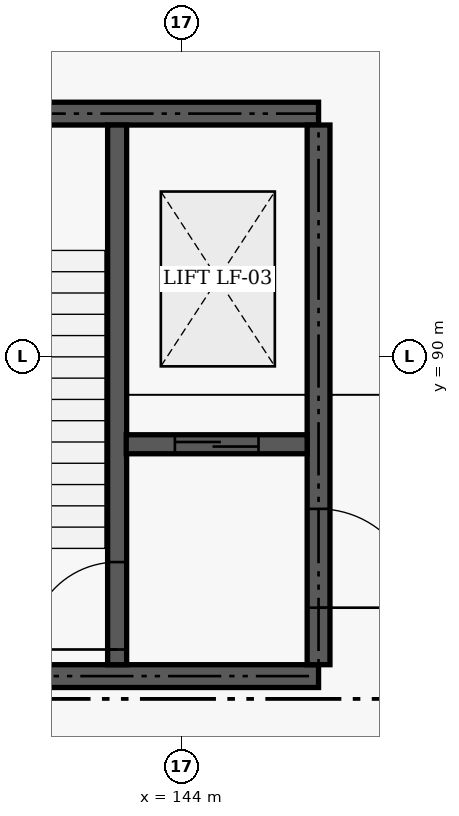
"""IFC4 building model, lengths in metres.
Left out: names, types, materials, properties, quantities, classifications, styles, units other than length and angle.
Written with IfcOpenShell. Run it as: python <this file> out.ifc"""

import sys

from ifc_helpers import new_model, si_unit, direction, frame, frame_2d, origin, place, context, subcontext, project, spatial, rectangle, extrude, element, fill, save


model = new_model("IFC4")
c1 = context("Model", 3, precision=1e-05, world=origin(), true_north=direction((0.0, 1.0)))
c2 = subcontext(c1, "Body", "Model", "MODEL_VIEW")
j1 = project(units=[si_unit("LENGTHUNIT", "METRE"), si_unit("PLANEANGLEUNIT", "RADIAN")], contexts=[c1])
p1 = place(None, origin())
s1 = spatial("IfcSite", under=j1, at=p1, CompositionType="ELEMENT")
p2 = place(p1, origin())
s2 = spatial("IfcBuilding", under=s1, at=p2, CompositionType="ELEMENT")
p3 = place(p2, origin())
s3 = spatial("IfcBuildingStorey", under=s2, at=p3, CompositionType="ELEMENT", Elevation=0.0)
p4 = place(p3, frame((139.2, 85.8, 0.0), z_axis=(0.0, 0.0, 1.0), x_axis=(1.0, 0.0, 0.0)))
e1 = element("IfcWall", 1, at=p4, inside=s3, PredefinedType="SHEAR", context=c2, shape_type="SweptSolid", body=[
    extrude(rectangle(XDim=6.6, YDim=0.3, at=frame_2d((3.3, 0.0))), origin(), (0.0, 0.0, 1.0), 5.4),
])
p5 = place(p4, frame((1.0, 0.0, 0.0)))
e2 = element("IfcOpeningElement", 2, at=p5, cuts=e1, PredefinedType="OPENING", context=c2, shape_type="SweptSolid", body=[
    extrude(rectangle(XDim=1.8, YDim=2.15, at=frame_2d((0.9, 1.075))), frame((0.0, 0.16, 0.0), z_axis=(0.0, -1.0, 0.0), x_axis=(1.0, 0.0, 0.0)), (0.0, 0.0, 1.0), 0.32),
])
p6 = place(p3, frame((139.2, 93.2, 0.0), z_axis=(0.0, 0.0, 1.0), x_axis=(1.0, 0.0, 0.0)))
e3 = element("IfcWall", 3, at=p6, inside=s3, PredefinedType="SHEAR", context=c2, shape_type="SweptSolid", body=[
    extrude(rectangle(XDim=6.6, YDim=0.3, at=frame_2d((3.3, 0.0))), origin(), (0.0, 0.0, 1.0), 5.4),
])
p7 = place(p3, frame((145.8, 85.95, 0.0), z_axis=(0.0, 0.0, 1.0), x_axis=(0.0, 1.0, 0.0)))
e4 = element("IfcWall", 4, at=p7, inside=s3, PredefinedType="SHEAR", context=c2, shape_type="SweptSolid", body=[
    extrude(rectangle(XDim=7.1, YDim=0.3, at=frame_2d((3.55, 0.0))), origin(), (0.0, 0.0, 1.0), 5.4),
])
p8 = place(p7, frame((0.75, 0.0, 0.0)))
e5 = element("IfcOpeningElement", 5, at=p8, cuts=e4, PredefinedType="OPENING", context=c2, shape_type="SweptSolid", body=[
    extrude(rectangle(XDim=1.3, YDim=2.15, at=frame_2d((0.65, 1.075))), frame((0.0, 0.16, 0.0), z_axis=(0.0, -1.0, 0.0), x_axis=(1.0, 0.0, 0.0)), (0.0, 0.0, 1.0), 0.32),
])
p9 = place(p3, frame((143.15, 85.95, 0.0), z_axis=(0.0, 0.0, 1.0), x_axis=(0.0, 1.0, 0.0)))
e6 = element("IfcWall", 6, at=p9, inside=s3, PredefinedType="SHEAR", context=c2, shape_type="SweptSolid", body=[
    extrude(rectangle(XDim=7.1, YDim=0.25, at=frame_2d((3.55, 0.0))), origin(), (0.0, 0.0, 1.0), 5.4),
])
p10 = place(p9, frame((0.2, 0.0, 0.0)))
e7 = element("IfcOpeningElement", 7, at=p10, cuts=e6, PredefinedType="OPENING", context=c2, shape_type="SweptSolid", body=[
    extrude(rectangle(XDim=1.15, YDim=2.15, at=frame_2d((0.575, 1.075))), frame((0.0, 0.135, 0.0), z_axis=(0.0, -1.0, 0.0), x_axis=(1.0, 0.0, 0.0)), (0.0, 0.0, 1.0), 0.27),
])
p11 = place(p3, frame((143.27, 88.85, 0.0), z_axis=(0.0, 0.0, 1.0), x_axis=(1.0, 0.0, 0.0)))
e8 = element("IfcWall", 8, at=p11, inside=s3, PredefinedType="SHEAR", context=c2, shape_type="SweptSolid", body=[
    extrude(rectangle(XDim=2.38, YDim=0.25, at=frame_2d((1.19, 0.0))), origin(), (0.0, 0.0, 1.0), 5.4),
])
p12 = place(p11, frame((0.64, 0.0, 0.0)))
e9 = element("IfcOpeningElement", 9, at=p12, cuts=e8, PredefinedType="OPENING", context=c2, shape_type="SweptSolid", body=[
    extrude(rectangle(XDim=1.1, YDim=2.15, at=frame_2d((0.55, 1.075))), frame((0.0, 0.135, 0.0), z_axis=(0.0, -1.0, 0.0), x_axis=(1.0, 0.0, 0.0)), (0.0, 0.0, 1.0), 0.27),
])
p13 = place(p8, frame((1.3, 0.0, 0.0), z_axis=(0.0, 0.0, 1.0), x_axis=(-1.0, 0.0, 0.0)))
e10 = element("IfcDoor", 10, at=p13, inside=s3, OperationType="DOUBLE_DOOR_SINGLE_SWING", PredefinedType="DOOR", context=c2, shape_type="SweptSolid", body=[
    extrude(rectangle(XDim=1.3, YDim=2.15, at=frame_2d((0.65, 1.075))), frame((0.0, 0.025, 0.0), z_axis=(0.0, -1.0, 0.0), x_axis=(1.0, 0.0, 0.0)), (0.0, 0.0, 1.0), 0.05),
])
fill(e5, e10)
p14 = place(p10, origin())
e11 = element("IfcDoor", 11, at=p14, inside=s3, OperationType="SINGLE_SWING_LEFT", PredefinedType="DOOR", context=c2, shape_type="SweptSolid", body=[
    extrude(rectangle(XDim=1.15, YDim=2.15, at=frame_2d((0.575, 1.075))), frame((0.0, 0.025, 0.0), z_axis=(0.0, -1.0, 0.0), x_axis=(1.0, 0.0, 0.0)), (0.0, 0.0, 1.0), 0.05),
])
fill(e7, e11)
p15 = place(p12, origin())
e12 = element("IfcDoor", 12, at=p15, inside=s3, OperationType="SLIDING_TO_LEFT", PredefinedType="DOOR", context=c2, shape_type="SweptSolid", body=[
    extrude(rectangle(XDim=1.1, YDim=2.15, at=frame_2d((0.55, 1.075))), frame((0.0, 0.025, 0.0), z_axis=(0.0, -1.0, 0.0), x_axis=(1.0, 0.0, 0.0)), (0.0, 0.0, 1.0), 0.05),
])
fill(e9, e12)
save(model, sys.argv[1])
